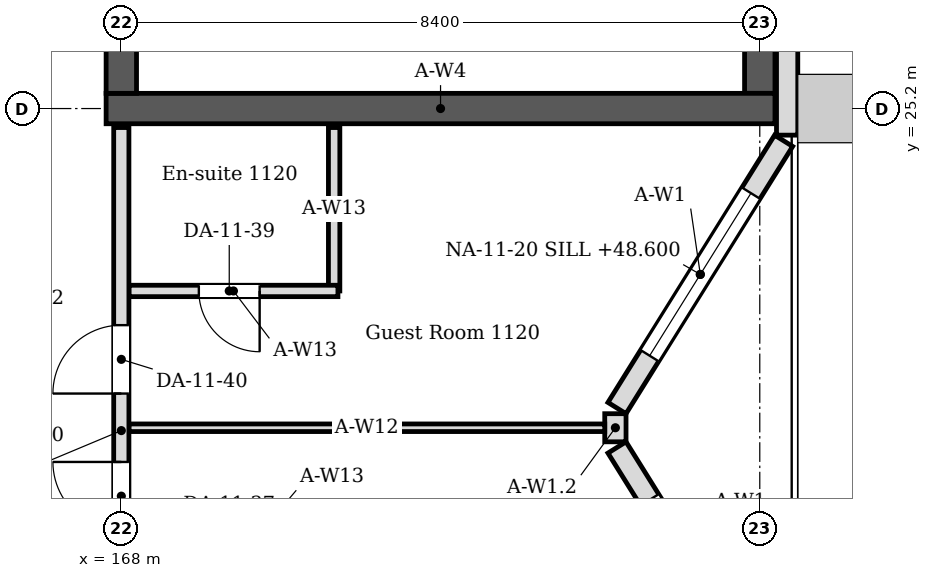
"""IFC4 building model, lengths in metres.
Left out: names, types, materials, properties, quantities, classifications, styles, units other than length and angle.
Written with IfcOpenShell. Run it as: python <this file> out.ifc"""

import sys

from ifc_helpers import new_model, si_unit, direction, frame, frame_2d, origin, place, context, subcontext, project, spatial, rectangle, extrude, element, fill, save


model = new_model("IFC4")
c1 = context("Model", 3, precision=1e-05, world=origin(), true_north=direction((0.0, 1.0)))
c2 = subcontext(c1, "Body", "Model", "MODEL_VIEW")
j1 = project(units=[si_unit("LENGTHUNIT", "METRE"), si_unit("PLANEANGLEUNIT", "RADIAN")], contexts=[c1])
p1 = place(None, origin())
s1 = spatial("IfcSite", under=j1, at=p1, CompositionType="ELEMENT")
p2 = place(p1, origin())
s2 = spatial("IfcBuilding", under=s1, at=p2, CompositionType="ELEMENT")
p3 = place(p2, frame((0.0, 0.0, 48.0)))
s3 = spatial("IfcBuildingStorey", under=s2, at=p3, CompositionType="ELEMENT", Elevation=48.0)
p4 = place(p3, frame((167.8, 25.2, 0.0), z_axis=(0.0, 0.0, 1.0), x_axis=(1.0, 0.0, 0.0)))
e1 = element("IfcWall", 1, at=p4, inside=s3, PredefinedType="SOLIDWALL", context=c2, shape_type="SweptSolid", body=[
    extrude(rectangle(XDim=8.8, YDim=0.4, at=frame_2d((4.4, 0.0))), origin(), (0.0, 0.0, 1.0), 4.05),
])
p5 = place(p3, frame((168.0, 25.4, 0.0), z_axis=(0.0, 0.0, 1.0), x_axis=(0.0, 1.0, 0.0)))
e2 = element("IfcWall", 2, at=p5, inside=s3, PredefinedType="SOLIDWALL", context=c2, shape_type="SweptSolid", body=[
    extrude(rectangle(XDim=16.4, YDim=0.4, at=frame_2d((8.2, 0.0))), origin(), (0.0, 0.0, 1.0), 4.05),
])
p6 = place(p5, frame((1.0, 0.0, 0.0)))
e3 = element("IfcOpeningElement", 3, at=p6, cuts=e2, PredefinedType="OPENING", context=c2, shape_type="SweptSolid", body=[
    extrude(rectangle(XDim=1.0, YDim=2.1, at=frame_2d((0.5, 1.05))), frame((0.0, 0.21, 0.0), z_axis=(0.0, -1.0, 0.0), x_axis=(1.0, 0.0, 0.0)), (0.0, 0.0, 1.0), 0.42),
])
p7 = place(p5, frame((14.4, 0.0, 0.0)))
e4 = element("IfcOpeningElement", 4, at=p7, cuts=e2, PredefinedType="OPENING", context=c2, shape_type="SweptSolid", body=[
    extrude(rectangle(XDim=1.4, YDim=2.1, at=frame_2d((0.7, 1.05))), frame((0.0, 0.21, 0.0), z_axis=(0.0, -1.0, 0.0), x_axis=(1.0, 0.0, 0.0)), (0.0, 0.0, 1.0), 0.42),
])
p8 = place(p3, frame((176.4, 25.4, 0.0), z_axis=(0.0, 0.0, 1.0), x_axis=(0.0, 1.0, 0.0)))
e5 = element("IfcWall", 5, at=p8, inside=s3, PredefinedType="SOLIDWALL", context=c2, shape_type="SweptSolid", body=[
    extrude(rectangle(XDim=16.4, YDim=0.4, at=frame_2d((8.2, 0.0))), origin(), (0.0, 0.0, 1.0), 4.05),
])
p9 = place(p3, frame((176.714, 17.224, 0.0), z_axis=(0.0, 0.0, 1.0), x_axis=(-0.529018946142, 0.848610013271, 0.0)))
e6 = element("IfcWall", 6, at=p9, inside=s3, PredefinedType="SOLIDWALL", context=c2, shape_type="SweptSolid", body=[
    extrude(rectangle(XDim=4.144, YDim=0.28, at=frame_2d((2.072, 0.0))), origin(), (0.0, 0.0, 1.0), 4.05),
])
p10 = place(p9, frame((0.812, 0.0, 0.6)))
e7 = element("IfcOpeningElement", 7, at=p10, cuts=e6, PredefinedType="OPENING", context=c2, shape_type="SweptSolid", body=[
    extrude(rectangle(XDim=2.52, YDim=2.4, at=frame_2d((1.26, 1.2))), frame((0.0, 0.15, 0.0), z_axis=(0.0, -1.0, 0.0), x_axis=(1.0, 0.0, 0.0)), (0.0, 0.0, 1.0), 0.3),
])
p11 = place(p3, frame((174.521, 21.259, 0.0), z_axis=(0.0, 0.0, 1.0), x_axis=(0.529018946142, 0.848610013271, 0.0)))
e8 = element("IfcWall", 8, at=p11, inside=s3, PredefinedType="SOLIDWALL", context=c2, shape_type="SweptSolid", body=[
    extrude(rectangle(XDim=4.144, YDim=0.28, at=frame_2d((2.072, 0.0))), origin(), (0.0, 0.0, 1.0), 4.05),
])
p12 = place(p11, frame((0.812, 0.0, 0.6)))
e9 = element("IfcOpeningElement", 9, at=p12, cuts=e8, PredefinedType="OPENING", context=c2, shape_type="SweptSolid", body=[
    extrude(rectangle(XDim=2.52, YDim=2.4, at=frame_2d((1.26, 1.2))), frame((0.0, 0.15, 0.0), z_axis=(0.0, -1.0, 0.0), x_axis=(1.0, 0.0, 0.0)), (0.0, 0.0, 1.0), 0.3),
])
p13 = place(p3, frame((174.5, 20.815, 0.0), z_axis=(0.0, 0.0, 1.0), x_axis=(0.0, 1.0, 0.0)))
e10 = element("IfcWall", 10, at=p13, inside=s3, PredefinedType="SOLIDWALL", context=c2, shape_type="SweptSolid", body=[
    extrude(rectangle(XDim=0.37, YDim=0.28, at=frame_2d((0.185, 0.0))), origin(), (0.0, 0.0, 1.0), 3.604),
])
p14 = place(p3, frame((176.76, 24.85, 0.0), z_axis=(0.0, 0.0, 1.0), x_axis=(0.0, 1.0, 0.0)))
e11 = element("IfcWall", 11, at=p14, inside=s3, PredefinedType="SOLIDWALL", context=c2, shape_type="SweptSolid", body=[
    extrude(rectangle(XDim=42.57, YDim=0.28, at=frame_2d((21.285, 0.0))), origin(), (0.0, 0.0, 1.0), 4.05),
])
p15 = place(p14, frame((17.57, 0.0, 0.6)))
e12 = element("IfcOpeningElement", 12, at=p15, cuts=e11, PredefinedType="OPENING", context=c2, shape_type="SweptSolid", body=[
    extrude(rectangle(XDim=2.52, YDim=2.4, at=frame_2d((1.26, 1.2))), frame((0.0, 0.15, 0.0), z_axis=(0.0, -1.0, 0.0), x_axis=(1.0, 0.0, 0.0)), (0.0, 0.0, 1.0), 0.3),
])
p16 = place(p14, frame((21.77, 0.0, 0.6)))
e13 = element("IfcOpeningElement", 13, at=p16, cuts=e11, PredefinedType="OPENING", context=c2, shape_type="SweptSolid", body=[
    extrude(rectangle(XDim=2.52, YDim=2.4, at=frame_2d((1.26, 1.2))), frame((0.0, 0.15, 0.0), z_axis=(0.0, -1.0, 0.0), x_axis=(1.0, 0.0, 0.0)), (0.0, 0.0, 1.0), 0.3),
])
p17 = place(p14, frame((26.39, 0.0, 0.6)))
e14 = element("IfcOpeningElement", 14, at=p17, cuts=e11, PredefinedType="OPENING", context=c2, shape_type="SweptSolid", body=[
    extrude(rectangle(XDim=2.52, YDim=2.4, at=frame_2d((1.26, 1.2))), frame((0.0, 0.15, 0.0), z_axis=(0.0, -1.0, 0.0), x_axis=(1.0, 0.0, 0.0)), (0.0, 0.0, 1.0), 0.3),
])
p18 = place(p14, frame((30.59, 0.0, 0.6)))
e15 = element("IfcOpeningElement", 15, at=p18, cuts=e11, PredefinedType="OPENING", context=c2, shape_type="SweptSolid", body=[
    extrude(rectangle(XDim=2.52, YDim=2.4, at=frame_2d((1.26, 1.2))), frame((0.0, 0.15, 0.0), z_axis=(0.0, -1.0, 0.0), x_axis=(1.0, 0.0, 0.0)), (0.0, 0.0, 1.0), 0.3),
])
p19 = place(p3, frame((170.8, 22.8, 0.0), z_axis=(0.0, 0.0, 1.0), x_axis=(0.0, 1.0, 0.0)))
e16 = element("IfcWall", 16, at=p19, inside=s3, PredefinedType="PARTITIONING", context=c2, shape_type="SweptSolid", body=[
    extrude(rectangle(XDim=2.15, YDim=0.15, at=frame_2d((1.075, 0.0))), origin(), (0.0, 0.0, 1.0), 4.05),
])
p20 = place(p3, frame((170.85, 22.8, 0.0), z_axis=(0.0, 0.0, 1.0), x_axis=(-1.0, 0.0, 0.0)))
e17 = element("IfcWall", 17, at=p20, inside=s3, PredefinedType="PARTITIONING", context=c2, shape_type="SweptSolid", body=[
    extrude(rectangle(XDim=2.75, YDim=0.15, at=frame_2d((1.375, 0.0))), origin(), (0.0, 0.0, 1.0), 4.05),
])
p21 = place(p20, frame((1.03, 0.0, 0.0)))
e18 = element("IfcOpeningElement", 18, at=p21, cuts=e17, PredefinedType="OPENING", context=c2, shape_type="SweptSolid", body=[
    extrude(rectangle(XDim=0.8, YDim=2.1, at=frame_2d((0.4, 1.05))), frame((0.0, 0.085, 0.0), z_axis=(0.0, -1.0, 0.0), x_axis=(1.0, 0.0, 0.0)), (0.0, 0.0, 1.0), 0.17),
])
p22 = place(p3, frame((168.1, 21.0, 0.0), z_axis=(0.0, 0.0, 1.0), x_axis=(1.0, 0.0, 0.0)))
e19 = element("IfcWall", 19, at=p22, inside=s3, PredefinedType="PARTITIONING", context=c2, shape_type="SweptSolid", body=[
    extrude(rectangle(XDim=6.26, YDim=0.1, at=frame_2d((3.13, 0.0))), origin(), (0.0, 0.0, 1.0), 3.604),
])
p23 = place(p3, frame((168.0, 16.975, 0.0), z_axis=(0.0, 0.0, 1.0), x_axis=(0.0, 1.0, 0.0)))
e20 = element("IfcWall", 20, at=p23, inside=s3, PredefinedType="PARTITIONING", context=c2, shape_type="SweptSolid", body=[
    extrude(rectangle(XDim=7.975, YDim=0.2, at=frame_2d((3.987, 0.0))), origin(), (0.0, 0.0, 1.0), 3.45),
])
p24 = place(p23, frame((2.675, 0.0, 0.0)))
e21 = element("IfcOpeningElement", 21, at=p24, cuts=e20, PredefinedType="OPENING", context=c2, shape_type="SweptSolid", body=[
    extrude(rectangle(XDim=0.9, YDim=2.1, at=frame_2d((0.45, 1.05))), frame((0.0, 0.11, 0.0), z_axis=(0.0, -1.0, 0.0), x_axis=(1.0, 0.0, 0.0)), (0.0, 0.0, 1.0), 0.22),
])
p25 = place(p23, frame((4.475, 0.0, 0.0)))
e22 = element("IfcOpeningElement", 22, at=p25, cuts=e20, PredefinedType="OPENING", context=c2, shape_type="SweptSolid", body=[
    extrude(rectangle(XDim=0.9, YDim=2.1, at=frame_2d((0.45, 1.05))), frame((0.0, 0.11, 0.0), z_axis=(0.0, -1.0, 0.0), x_axis=(1.0, 0.0, 0.0)), (0.0, 0.0, 1.0), 0.22),
])
p26 = place(p12, origin())
e23 = element("IfcWindow", 23, at=p26, inside=s3, PartitioningType="SINGLE_PANEL", PredefinedType="WINDOW", context=c2, shape_type="SweptSolid", body=[
    extrude(rectangle(XDim=2.52, YDim=2.4, at=frame_2d((1.26, 1.2))), frame((0.0, 0.03, 0.0), z_axis=(0.0, -1.0, 0.0), x_axis=(1.0, 0.0, 0.0)), (0.0, 0.0, 1.0), 0.06),
])
fill(e9, e23)
p27 = place(p24, origin())
e24 = element("IfcDoor", 24, at=p27, inside=s3, OperationType="SINGLE_SWING_RIGHT", PredefinedType="DOOR", context=c2, shape_type="SweptSolid", body=[
    extrude(rectangle(XDim=0.9, YDim=2.1, at=frame_2d((0.45, 1.05))), frame((0.0, 0.025, 0.0), z_axis=(0.0, -1.0, 0.0), x_axis=(1.0, 0.0, 0.0)), (0.0, 0.0, 1.0), 0.05),
])
fill(e21, e24)
p28 = place(p21, origin())
e25 = element("IfcDoor", 25, at=p28, inside=s3, OperationType="SINGLE_SWING_LEFT", PredefinedType="DOOR", context=c2, shape_type="SweptSolid", body=[
    extrude(rectangle(XDim=0.8, YDim=2.1, at=frame_2d((0.4, 1.05))), frame((0.0, 0.025, 0.0), z_axis=(0.0, -1.0, 0.0), x_axis=(1.0, 0.0, 0.0)), (0.0, 0.0, 1.0), 0.05),
])
fill(e18, e25)
p29 = place(p25, origin())
e26 = element("IfcDoor", 26, at=p29, inside=s3, OperationType="SINGLE_SWING_LEFT", PredefinedType="DOOR", context=c2, shape_type="SweptSolid", body=[
    extrude(rectangle(XDim=0.9, YDim=2.1, at=frame_2d((0.45, 1.05))), frame((0.0, 0.025, 0.0), z_axis=(0.0, -1.0, 0.0), x_axis=(1.0, 0.0, 0.0)), (0.0, 0.0, 1.0), 0.05),
])
fill(e22, e26)
save(model, sys.argv[1])
